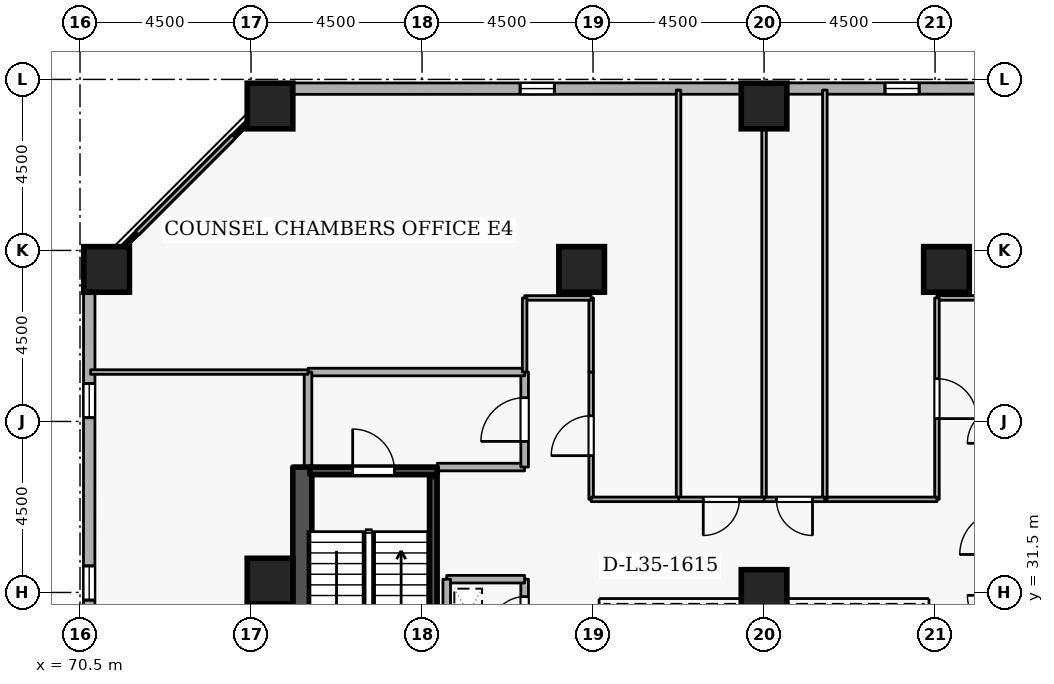
"""IFC4 building model, lengths in metres.
Left out: names, types, materials, properties, quantities, classifications, styles, units other than length and angle.
Written with IfcOpenShell. Run it as: python <this file> out.ifc"""

import sys

from ifc_helpers import new_model, si_unit, direction, frame, frame_2d, origin, origin_2d, place, context, subcontext, project, spatial, rectangle, extrude, element, fill, save


model = new_model("IFC4")
c1 = context("Model", 3, precision=1e-05, world=origin(), true_north=direction((0.0, 1.0)))
c2 = subcontext(c1, "Body", "Model", "MODEL_VIEW")
j1 = project(units=[si_unit("LENGTHUNIT", "METRE"), si_unit("PLANEANGLEUNIT", "RADIAN")], contexts=[c1])
p1 = place(None, origin())
s1 = spatial("IfcSite", under=j1, at=p1, CompositionType="ELEMENT")
p2 = place(p1, origin())
s2 = spatial("IfcBuilding", under=s1, at=p2, CompositionType="ELEMENT")
p3 = place(p2, frame((0.0, 0.0, 134.1)))
s3 = spatial("IfcBuildingStorey", under=s2, at=p3, CompositionType="ELEMENT", Elevation=134.1)
p4 = place(p3, frame((76.35, 19.2, 0.0), z_axis=(0.0, 0.0, 1.0), x_axis=(0.0, 1.0, 0.0)))
e1 = element("IfcWall", 1, at=p4, inside=s3, PredefinedType="SHEAR", context=c2, shape_type="SweptSolid", body=[
    extrude(rectangle(XDim=15.6, YDim=0.5, at=frame_2d((7.8, 0.0))), origin(), (0.0, 0.0, 1.0), 3.6),
])
for number, where, z_axis, x_axis in (
    (2, (88.5, 44.3, 0.0), (0.0, 0.0, 1.0), (1.0, 0.0, 0.0)),
    (3, (75.5, 44.3, 0.0), (0.0, 0.0, 1.0), (1.0, 0.0, 0.0)),
    (4, (71.2, 40.0, 0.0), (0.0, 0.0, 1.0), (1.0, 0.0, 0.0)),
    (5, (93.3, 40.0, 0.0), (0.0, 0.0, 1.0), (1.0, 0.0, 0.0)),
    (6, (83.7, 40.0, 0.0), (0.0, 0.0, 1.0), (1.0, 0.0, 0.0)),
    (7, (75.5, 31.8, 0.0), (0.0, 0.0, 1.0), (1.0, 0.0, 0.0)),
    (8, (88.5, 31.5, 0.0), (0.0, 0.0, 1.0), (1.0, 0.0, 0.0)),
):
    element("IfcColumn", number, at=place(p3, frame(where, z_axis=z_axis, x_axis=x_axis)), inside=s3, PredefinedType="COLUMN", context=c2, shape_type="SweptSolid", body=[
        extrude(rectangle(XDim=1.2, YDim=1.2, at=origin_2d()), origin(), (0.0, 0.0, 1.0), 3.6),
    ])
p5 = place(p3, frame((109.681, 44.765, 0.0), z_axis=(0.0, 0.0, 1.0), x_axis=(-0.999999969988, -0.000244999128, 0.0)))
e9 = element("IfcWall", 9, at=p5, inside=s3, PredefinedType="STANDARD", context=c2, shape_type="SweptSolid", body=[
    extrude(rectangle(XDim=33.881, YDim=0.3, at=frame_2d((16.94, 0.0))), origin(), (0.0, 0.0, 1.0), 2.7),
])
p6 = place(p5, frame((2.7, 0.0, 0.72)))
e10 = element("IfcOpeningElement", 10, at=p6, cuts=e9, PredefinedType="OPENING", context=c2, shape_type="SweptSolid", body=[
    extrude(rectangle(XDim=0.9, YDim=1.75, at=frame_2d((0.45, 0.875))), frame((0.0, 0.16, 0.0), z_axis=(0.0, -1.0, 0.0), x_axis=(1.0, 0.0, 0.0)), (0.0, 0.0, 1.0), 0.32),
])
p7 = place(p5, frame((12.3, 0.0, 0.72)))
e11 = element("IfcOpeningElement", 11, at=p7, cuts=e9, PredefinedType="OPENING", context=c2, shape_type="SweptSolid", body=[
    extrude(rectangle(XDim=0.9, YDim=1.75, at=frame_2d((0.45, 0.875))), frame((0.0, 0.16, 0.0), z_axis=(0.0, -1.0, 0.0), x_axis=(1.0, 0.0, 0.0)), (0.0, 0.0, 1.0), 0.32),
])
p8 = place(p5, frame((17.1, 0.0, 0.72)))
e12 = element("IfcOpeningElement", 12, at=p8, cuts=e9, PredefinedType="OPENING", context=c2, shape_type="SweptSolid", body=[
    extrude(rectangle(XDim=0.9, YDim=1.75, at=frame_2d((0.45, 0.875))), frame((0.0, 0.16, 0.0), z_axis=(0.0, -1.0, 0.0), x_axis=(1.0, 0.0, 0.0)), (0.0, 0.0, 1.0), 0.32),
])
p9 = place(p5, frame((26.7, 0.0, 0.72)))
e13 = element("IfcOpeningElement", 13, at=p9, cuts=e9, PredefinedType="OPENING", context=c2, shape_type="SweptSolid", body=[
    extrude(rectangle(XDim=0.9, YDim=1.75, at=frame_2d((0.45, 0.875))), frame((0.0, 0.16, 0.0), z_axis=(0.0, -1.0, 0.0), x_axis=(1.0, 0.0, 0.0)), (0.0, 0.0, 1.0), 0.32),
])
p10 = place(p3, frame((70.744, 39.699, 0.0), z_axis=(0.0, 0.0, 1.0), x_axis=(-0.000244999128, -0.999999969988, 0.0)))
e14 = element("IfcWall", 14, at=p10, inside=s3, PredefinedType="STANDARD", context=c2, shape_type="SweptSolid", body=[
    extrude(rectangle(XDim=33.881, YDim=0.3, at=frame_2d((16.94, 0.0))), origin(), (0.0, 0.0, 1.0), 2.7),
])
p11 = place(p10, frame((2.7, 0.0, 0.72)))
e15 = element("IfcOpeningElement", 15, at=p11, cuts=e14, PredefinedType="OPENING", context=c2, shape_type="SweptSolid", body=[
    extrude(rectangle(XDim=0.9, YDim=1.75, at=frame_2d((0.45, 0.875))), frame((0.0, 0.16, 0.0), z_axis=(0.0, -1.0, 0.0), x_axis=(1.0, 0.0, 0.0)), (0.0, 0.0, 1.0), 0.32),
])
p12 = place(p10, frame((7.5, 0.0, 0.72)))
e16 = element("IfcOpeningElement", 16, at=p12, cuts=e14, PredefinedType="OPENING", context=c2, shape_type="SweptSolid", body=[
    extrude(rectangle(XDim=0.9, YDim=1.75, at=frame_2d((0.45, 0.875))), frame((0.0, 0.16, 0.0), z_axis=(0.0, -1.0, 0.0), x_axis=(1.0, 0.0, 0.0)), (0.0, 0.0, 1.0), 0.32),
])
p13 = place(p10, frame((17.1, 0.0, 0.72)))
e17 = element("IfcOpeningElement", 17, at=p13, cuts=e14, PredefinedType="OPENING", context=c2, shape_type="SweptSolid", body=[
    extrude(rectangle(XDim=0.9, YDim=1.75, at=frame_2d((0.45, 0.875))), frame((0.0, 0.16, 0.0), z_axis=(0.0, -1.0, 0.0), x_axis=(1.0, 0.0, 0.0)), (0.0, 0.0, 1.0), 0.32),
])
p14 = place(p10, frame((21.9, 0.0, 0.72)))
e18 = element("IfcOpeningElement", 18, at=p14, cuts=e14, PredefinedType="OPENING", context=c2, shape_type="SweptSolid", body=[
    extrude(rectangle(XDim=0.9, YDim=1.75, at=frame_2d((0.45, 0.875))), frame((0.0, 0.16, 0.0), z_axis=(0.0, -1.0, 0.0), x_axis=(1.0, 0.0, 0.0)), (0.0, 0.0, 1.0), 0.32),
])
p15 = place(p3, frame((76.55, 34.7, 0.0), z_axis=(0.0, 0.0, 1.0), x_axis=(1.0, 0.0, 0.0)))
e19 = element("IfcWall", 19, at=p15, inside=s3, PredefinedType="SHEAR", context=c2, shape_type="SweptSolid", body=[
    extrude(rectangle(XDim=3.35, YDim=0.2, at=frame_2d((1.675, 0.0))), origin(), (0.0, 0.0, 1.0), 3.6),
])
p16 = place(p15, frame((1.125, 0.0, 0.0)))
e20 = element("IfcOpeningElement", 20, at=p16, cuts=e19, PredefinedType="OPENING", context=c2, shape_type="SweptSolid", body=[
    extrude(rectangle(XDim=1.1, YDim=2.1, at=frame_2d((0.55, 1.05))), frame((0.0, 0.11, 0.0), z_axis=(0.0, -1.0, 0.0), x_axis=(1.0, 0.0, 0.0)), (0.0, 0.0, 1.0), 0.22),
])
p17 = place(p3, frame((79.797, 27.45, 0.0), z_axis=(0.0, 0.0, 1.0), x_axis=(0.0, 1.0, 0.0)))
e21 = element("IfcWall", 21, at=p17, inside=s3, PredefinedType="SHEAR", context=c2, shape_type="SweptSolid", body=[
    extrude(rectangle(XDim=7.1, YDim=0.2, at=frame_2d((3.55, 0.0))), origin(), (0.0, 0.0, 1.0), 3.6),
])
p18 = place(p3, frame((79.9, 34.8, 0.0), z_axis=(0.0, 0.0, 1.0), x_axis=(1.0, 0.0, 0.0)))
e22 = element("IfcWall", 22, at=p18, inside=s3, PredefinedType="STANDARD", context=c2, shape_type="SweptSolid", body=[
    extrude(rectangle(XDim=2.3, YDim=0.2, at=frame_2d((1.15, 0.0))), origin(), (0.0, 0.0, 1.0), 2.545),
])
p19 = place(p3, frame((82.2, 34.8, 0.0), z_axis=(0.0, 0.0, 1.0), x_axis=(0.0, 1.0, 0.0)))
e23 = element("IfcWall", 23, at=p19, inside=s3, PredefinedType="STANDARD", context=c2, shape_type="SweptSolid", body=[
    extrude(rectangle(XDim=2.5, YDim=0.2, at=frame_2d((1.25, 0.0))), origin(), (0.0, 0.0, 1.0), 3.34),
])
p20 = place(p19, frame((0.675, 0.0, 0.0)))
e24 = element("IfcOpeningElement", 24, at=p20, cuts=e23, PredefinedType="OPENING", context=c2, shape_type="SweptSolid", body=[
    extrude(rectangle(XDim=1.15, YDim=2.1, at=frame_2d((0.575, 1.05))), frame((0.0, 0.11, 0.0), z_axis=(0.0, -1.0, 0.0), x_axis=(1.0, 0.0, 0.0)), (0.0, 0.0, 1.0), 0.22),
])
p21 = place(p3, frame((82.2, 37.3, 0.0), z_axis=(0.0, 0.0, 1.0), x_axis=(-1.0, 0.0, 0.0)))
e25 = element("IfcWall", 25, at=p21, inside=s3, PredefinedType="STANDARD", context=c2, shape_type="SweptSolid", body=[
    extrude(rectangle(XDim=5.7, YDim=0.2, at=frame_2d((2.85, 0.0))), origin(), (0.0, 0.0, 1.0), 3.34),
])
p22 = place(p3, frame((76.5, 37.3, 0.0), z_axis=(0.0, 0.0, 1.0), x_axis=(0.0, -1.0, 0.0)))
e26 = element("IfcWall", 26, at=p22, inside=s3, PredefinedType="STANDARD", context=c2, shape_type="SweptSolid", body=[
    extrude(rectangle(XDim=2.5, YDim=0.2, at=frame_2d((1.25, 0.0))), origin(), (0.0, 0.0, 1.0), 3.34),
])
p23 = place(p3, frame((82.2, 30.05, 0.0), z_axis=(0.0, 0.0, 1.0), x_axis=(0.0, 1.0, 0.0)))
e27 = element("IfcWall", 27, at=p23, inside=s3, PredefinedType="STANDARD", context=c2, shape_type="SweptSolid", body=[
    extrude(rectangle(XDim=1.8, YDim=0.2, at=frame_2d((0.9, 0.0))), origin(), (0.0, 0.0, 1.0), 3.34),
])
p24 = place(p23, frame((0.46, 0.0, 0.0)))
e28 = element("IfcOpeningElement", 28, at=p24, cuts=e27, PredefinedType="OPENING", context=c2, shape_type="SweptSolid", body=[
    extrude(rectangle(XDim=0.88, YDim=2.04, at=frame_2d((0.44, 1.02))), frame((0.0, 0.11, 0.0), z_axis=(0.0, -1.0, 0.0), x_axis=(1.0, 0.0, 0.0)), (0.0, 0.0, 1.0), 0.22),
])
p25 = place(p3, frame((82.2, 31.85, 0.0), z_axis=(0.0, 0.0, 1.0), x_axis=(-1.0, 0.0, 0.0)))
e29 = element("IfcWall", 29, at=p25, inside=s3, PredefinedType="STANDARD", context=c2, shape_type="SweptSolid", body=[
    extrude(rectangle(XDim=2.05, YDim=0.2, at=frame_2d((1.025, 0.0))), origin(), (0.0, 0.0, 1.0), 3.34),
])
p26 = place(p3, frame((80.15, 31.85, 0.0), z_axis=(0.0, 0.0, 1.0), x_axis=(0.0, -1.0, 0.0)))
e30 = element("IfcWall", 30, at=p26, inside=s3, PredefinedType="STANDARD", context=c2, shape_type="SweptSolid", body=[
    extrude(rectangle(XDim=1.8, YDim=0.2, at=frame_2d((0.9, 0.0))), origin(), (0.0, 0.0, 1.0), 3.34),
])
p27 = place(p3, frame((94.8, 39.25, 0.0), z_axis=(0.0, 0.0, 1.0), x_axis=(-1.0, 0.0, 0.0)))
e31 = element("IfcWall", 31, at=p27, inside=s3, PredefinedType="PARTITIONING", context=c2, shape_type="SweptSolid", body=[
    extrude(rectangle(XDim=1.75, YDim=0.12, at=frame_2d((0.875, 0.0))), origin(), (0.0, 0.0, 1.0), 3.34),
])
p28 = place(p3, frame((93.05, 39.25, 0.0), z_axis=(0.0, 0.0, 1.0), x_axis=(0.0, -1.0, 0.0)))
e32 = element("IfcWall", 32, at=p28, inside=s3, PredefinedType="PARTITIONING", context=c2, shape_type="SweptSolid", body=[
    extrude(rectangle(XDim=5.3, YDim=0.12, at=frame_2d((2.65, 0.0))), origin(), (0.0, 0.0, 1.0), 3.34),
])
p29 = place(p28, frame((2.125, 0.0, 0.0)))
e33 = element("IfcOpeningElement", 33, at=p29, cuts=e32, PredefinedType="OPENING", context=c2, shape_type="SweptSolid", body=[
    extrude(rectangle(XDim=1.05, YDim=2.1, at=frame_2d((0.525, 1.05))), frame((0.0, 0.07, 0.0), z_axis=(0.0, -1.0, 0.0), x_axis=(1.0, 0.0, 0.0)), (0.0, 0.0, 1.0), 0.14),
])
p30 = place(p3, frame((93.05, 33.95, 0.0), z_axis=(0.0, 0.0, 1.0), x_axis=(-1.0, 0.0, 0.0)))
e34 = element("IfcWall", 34, at=p30, inside=s3, PredefinedType="PARTITIONING", context=c2, shape_type="SweptSolid", body=[
    extrude(rectangle(XDim=2.95, YDim=0.12, at=frame_2d((1.475, 0.0))), origin(), (0.0, 0.0, 1.0), 3.34),
])
p31 = place(p3, frame((90.1, 33.95, 0.0), z_axis=(0.0, 0.0, 1.0), x_axis=(0.0, 1.0, 0.0)))
e35 = element("IfcWall", 35, at=p31, inside=s3, PredefinedType="PARTITIONING", context=c2, shape_type="SweptSolid", body=[
    extrude(rectangle(XDim=10.77, YDim=0.12, at=frame_2d((5.385, 0.0))), origin(), (0.0, 0.0, 1.0), 3.34),
])
p32 = place(p3, frame((88.5, 33.95, 0.0), z_axis=(0.0, 0.0, 1.0), x_axis=(0.0, 1.0, 0.0)))
e36 = element("IfcWall", 36, at=p32, inside=s3, PredefinedType="PARTITIONING", context=c2, shape_type="SweptSolid", body=[
    extrude(rectangle(XDim=10.77, YDim=0.12, at=frame_2d((5.385, 0.0))), origin(), (0.0, 0.0, 1.0), 2.878),
])
p33 = place(p3, frame((90.1, 33.95, 0.0), z_axis=(0.0, 0.0, 1.0), x_axis=(-1.0, 0.0, 0.0)))
e37 = element("IfcWall", 37, at=p33, inside=s3, PredefinedType="PARTITIONING", context=c2, shape_type="SweptSolid", body=[
    extrude(rectangle(XDim=1.6, YDim=0.12, at=frame_2d((0.8, 0.0))), origin(), (0.0, 0.0, 1.0), 3.34),
])
p34 = place(p33, frame((0.325, 0.0, 0.0)))
e38 = element("IfcOpeningElement", 38, at=p34, cuts=e37, PredefinedType="OPENING", context=c2, shape_type="SweptSolid", body=[
    extrude(rectangle(XDim=0.95, YDim=2.1, at=frame_2d((0.475, 1.05))), frame((0.0, 0.07, 0.0), z_axis=(0.0, -1.0, 0.0), x_axis=(1.0, 0.0, 0.0)), (0.0, 0.0, 1.0), 0.14),
])
p35 = place(p3, frame((86.25, 33.95, 0.0), z_axis=(0.0, 0.0, 1.0), x_axis=(0.0, 1.0, 0.0)))
e39 = element("IfcWall", 39, at=p35, inside=s3, PredefinedType="PARTITIONING", context=c2, shape_type="SweptSolid", body=[
    extrude(rectangle(XDim=10.77, YDim=0.12, at=frame_2d((5.385, 0.0))), origin(), (0.0, 0.0, 1.0), 3.34),
])
p36 = place(p3, frame((88.5, 33.95, 0.0), z_axis=(0.0, 0.0, 1.0), x_axis=(-1.0, 0.0, 0.0)))
e40 = element("IfcWall", 40, at=p36, inside=s3, PredefinedType="PARTITIONING", context=c2, shape_type="SweptSolid", body=[
    extrude(rectangle(XDim=2.25, YDim=0.12, at=frame_2d((1.125, 0.0))), origin(), (0.0, 0.0, 1.0), 3.34),
])
p37 = place(p36, frame((0.65, 0.0, 0.0)))
e41 = element("IfcOpeningElement", 41, at=p37, cuts=e40, PredefinedType="OPENING", context=c2, shape_type="SweptSolid", body=[
    extrude(rectangle(XDim=0.95, YDim=2.1, at=frame_2d((0.475, 1.05))), frame((0.0, 0.07, 0.0), z_axis=(0.0, -1.0, 0.0), x_axis=(1.0, 0.0, 0.0)), (0.0, 0.0, 1.0), 0.14),
])
p38 = place(p3, frame((83.95, 33.95, 0.0), z_axis=(0.0, 0.0, 1.0), x_axis=(0.0, 1.0, 0.0)))
e42 = element("IfcWall", 42, at=p38, inside=s3, PredefinedType="PARTITIONING", context=c2, shape_type="SweptSolid", body=[
    extrude(rectangle(XDim=3.35, YDim=0.12, at=frame_2d((1.675, 0.0))), origin(), (0.0, 0.0, 1.0), 3.34),
])
p39 = place(p38, frame((1.15, 0.0, 0.0)))
e43 = element("IfcOpeningElement", 43, at=p39, cuts=e42, PredefinedType="OPENING", context=c2, shape_type="SweptSolid", body=[
    extrude(rectangle(XDim=1.05, YDim=2.1, at=frame_2d((0.525, 1.05))), frame((0.0, 0.07, 0.0), z_axis=(0.0, -1.0, 0.0), x_axis=(1.0, 0.0, 0.0)), (0.0, 0.0, 1.0), 0.14),
])
p40 = place(p3, frame((83.95, 37.3, 0.0), z_axis=(0.0, 0.0, 1.0), x_axis=(0.0, 1.0, 0.0)))
e44 = element("IfcWall", 44, at=p40, inside=s3, PredefinedType="PARTITIONING", context=c2, shape_type="SweptSolid", body=[
    extrude(rectangle(XDim=1.95, YDim=0.12, at=frame_2d((0.975, 0.0))), origin(), (0.0, 0.0, 1.0), 3.34),
])
p41 = place(p3, frame((83.95, 39.25, 0.0), z_axis=(0.0, 0.0, 1.0), x_axis=(-1.0, 0.0, 0.0)))
e45 = element("IfcWall", 45, at=p41, inside=s3, PredefinedType="PARTITIONING", context=c2, shape_type="SweptSolid", body=[
    extrude(rectangle(XDim=1.75, YDim=0.12, at=frame_2d((0.875, 0.0))), origin(), (0.0, 0.0, 1.0), 3.34),
])
p42 = place(p3, frame((82.2, 39.25, 0.0), z_axis=(0.0, 0.0, 1.0), x_axis=(0.0, -1.0, 0.0)))
e46 = element("IfcWall", 46, at=p42, inside=s3, PredefinedType="PARTITIONING", context=c2, shape_type="SweptSolid", body=[
    extrude(rectangle(XDim=1.95, YDim=0.12, at=frame_2d((0.975, 0.0))), origin(), (0.0, 0.0, 1.0), 3.34),
])
p43 = place(p3, frame((76.5, 37.3, 0.0), z_axis=(0.0, 0.0, 1.0), x_axis=(-1.0, 0.0, 0.0)))
e47 = element("IfcWall", 47, at=p43, inside=s3, PredefinedType="PARTITIONING", context=c2, shape_type="SweptSolid", body=[
    extrude(rectangle(XDim=5.72, YDim=0.12, at=frame_2d((2.86, 0.0))), origin(), (0.0, 0.0, 1.0), 3.34),
])
p44 = place(p3, frame((70.78, 39.733, 0.0), z_axis=(0.0, 0.0, 1.0), x_axis=(0.707106781187, 0.707106781187, 0.0)))
e48 = element("IfcWall", 48, at=p44, inside=s3, PredefinedType="PARTITIONING", context=c2, shape_type="SweptSolid", body=[
    extrude(rectangle(XDim=7.052, YDim=0.12, at=frame_2d((3.526, 0.0))), origin(), (0.0, 0.0, 1.0), 3.34),
])
p45 = place(p3, frame((86.25, 33.95, 0.0), z_axis=(0.0, 0.0, 1.0), x_axis=(-1.0, 0.0, 0.0)))
e49 = element("IfcWall", 49, at=p45, inside=s3, PredefinedType="PARTITIONING", context=c2, shape_type="SweptSolid", body=[
    extrude(rectangle(XDim=2.3, YDim=0.12, at=frame_2d((1.15, 0.0))), origin(), (0.0, 0.0, 1.0), 3.34),
])
p46 = place(p8, origin())
e50 = element("IfcWindow", 50, at=p46, inside=s3, PartitioningType="SINGLE_PANEL", PredefinedType="WINDOW", context=c2, shape_type="SweptSolid", body=[
    extrude(rectangle(XDim=0.9, YDim=1.75, at=frame_2d((0.45, 0.875))), frame((0.0, 0.03, 0.0), z_axis=(0.0, -1.0, 0.0), x_axis=(1.0, 0.0, 0.0)), (0.0, 0.0, 1.0), 0.06),
])
fill(e12, e50)
p47 = place(p9, origin())
e51 = element("IfcWindow", 51, at=p47, inside=s3, PartitioningType="SINGLE_PANEL", PredefinedType="WINDOW", context=c2, shape_type="SweptSolid", body=[
    extrude(rectangle(XDim=0.9, YDim=1.75, at=frame_2d((0.45, 0.875))), frame((0.0, 0.03, 0.0), z_axis=(0.0, -1.0, 0.0), x_axis=(1.0, 0.0, 0.0)), (0.0, 0.0, 1.0), 0.06),
])
fill(e13, e51)
p48 = place(p11, origin())
e52 = element("IfcWindow", 52, at=p48, inside=s3, PartitioningType="SINGLE_PANEL", PredefinedType="WINDOW", context=c2, shape_type="SweptSolid", body=[
    extrude(rectangle(XDim=0.9, YDim=1.75, at=frame_2d((0.45, 0.875))), frame((0.0, 0.03, 0.0), z_axis=(0.0, -1.0, 0.0), x_axis=(1.0, 0.0, 0.0)), (0.0, 0.0, 1.0), 0.06),
])
fill(e15, e52)
p49 = place(p12, origin())
e53 = element("IfcWindow", 53, at=p49, inside=s3, PartitioningType="SINGLE_PANEL", PredefinedType="WINDOW", context=c2, shape_type="SweptSolid", body=[
    extrude(rectangle(XDim=0.9, YDim=1.75, at=frame_2d((0.45, 0.875))), frame((0.0, 0.03, 0.0), z_axis=(0.0, -1.0, 0.0), x_axis=(1.0, 0.0, 0.0)), (0.0, 0.0, 1.0), 0.06),
])
fill(e16, e53)
p50 = place(p16, origin())
e54 = element("IfcDoor", 54, at=p50, inside=s3, OperationType="SINGLE_SWING_LEFT", PredefinedType="DOOR", context=c2, shape_type="SweptSolid", body=[
    extrude(rectangle(XDim=1.1, YDim=2.1, at=frame_2d((0.55, 1.05))), frame((0.0, 0.025, 0.0), z_axis=(0.0, -1.0, 0.0), x_axis=(1.0, 0.0, 0.0)), (0.0, 0.0, 1.0), 0.05),
])
fill(e20, e54)
p51 = place(p20, origin())
e55 = element("IfcDoor", 55, at=p51, inside=s3, OperationType="SINGLE_SWING_LEFT", PredefinedType="DOOR", context=c2, shape_type="SweptSolid", body=[
    extrude(rectangle(XDim=1.15, YDim=2.1, at=frame_2d((0.575, 1.05))), frame((0.0, 0.025, 0.0), z_axis=(0.0, -1.0, 0.0), x_axis=(1.0, 0.0, 0.0)), (0.0, 0.0, 1.0), 0.05),
])
fill(e24, e55)
p52 = place(p24, origin())
e56 = element("IfcDoor", 56, at=p52, inside=s3, OperationType="SINGLE_SWING_LEFT", PredefinedType="DOOR", context=c2, shape_type="SweptSolid", body=[
    extrude(rectangle(XDim=0.88, YDim=2.04, at=frame_2d((0.44, 1.02))), frame((0.0, 0.025, 0.0), z_axis=(0.0, -1.0, 0.0), x_axis=(1.0, 0.0, 0.0)), (0.0, 0.0, 1.0), 0.05),
])
fill(e28, e56)
p53 = place(p29, origin())
e57 = element("IfcDoor", 57, at=p53, inside=s3, OperationType="SINGLE_SWING_RIGHT", PredefinedType="DOOR", context=c2, shape_type="SweptSolid", body=[
    extrude(rectangle(XDim=1.05, YDim=2.1, at=frame_2d((0.525, 1.05))), frame((0.0, 0.025, 0.0), z_axis=(0.0, -1.0, 0.0), x_axis=(1.0, 0.0, 0.0)), (0.0, 0.0, 1.0), 0.05),
])
fill(e33, e57)
p54 = place(p34, origin())
e58 = element("IfcDoor", 58, at=p54, inside=s3, OperationType="SINGLE_SWING_LEFT", PredefinedType="DOOR", context=c2, shape_type="SweptSolid", body=[
    extrude(rectangle(XDim=0.95, YDim=2.1, at=frame_2d((0.475, 1.05))), frame((0.0, 0.025, 0.0), z_axis=(0.0, -1.0, 0.0), x_axis=(1.0, 0.0, 0.0)), (0.0, 0.0, 1.0), 0.05),
])
fill(e38, e58)
p55 = place(p37, origin())
e59 = element("IfcDoor", 59, at=p55, inside=s3, OperationType="SINGLE_SWING_RIGHT", PredefinedType="DOOR", context=c2, shape_type="SweptSolid", body=[
    extrude(rectangle(XDim=0.95, YDim=2.1, at=frame_2d((0.475, 1.05))), frame((0.0, 0.025, 0.0), z_axis=(0.0, -1.0, 0.0), x_axis=(1.0, 0.0, 0.0)), (0.0, 0.0, 1.0), 0.05),
])
fill(e41, e59)
p56 = place(p39, origin())
e60 = element("IfcDoor", 60, at=p56, inside=s3, OperationType="SINGLE_SWING_LEFT", PredefinedType="DOOR", context=c2, shape_type="SweptSolid", body=[
    extrude(rectangle(XDim=1.05, YDim=2.1, at=frame_2d((0.525, 1.05))), frame((0.0, 0.025, 0.0), z_axis=(0.0, -1.0, 0.0), x_axis=(1.0, 0.0, 0.0)), (0.0, 0.0, 1.0), 0.05),
])
fill(e43, e60)
save(model, sys.argv[1])
